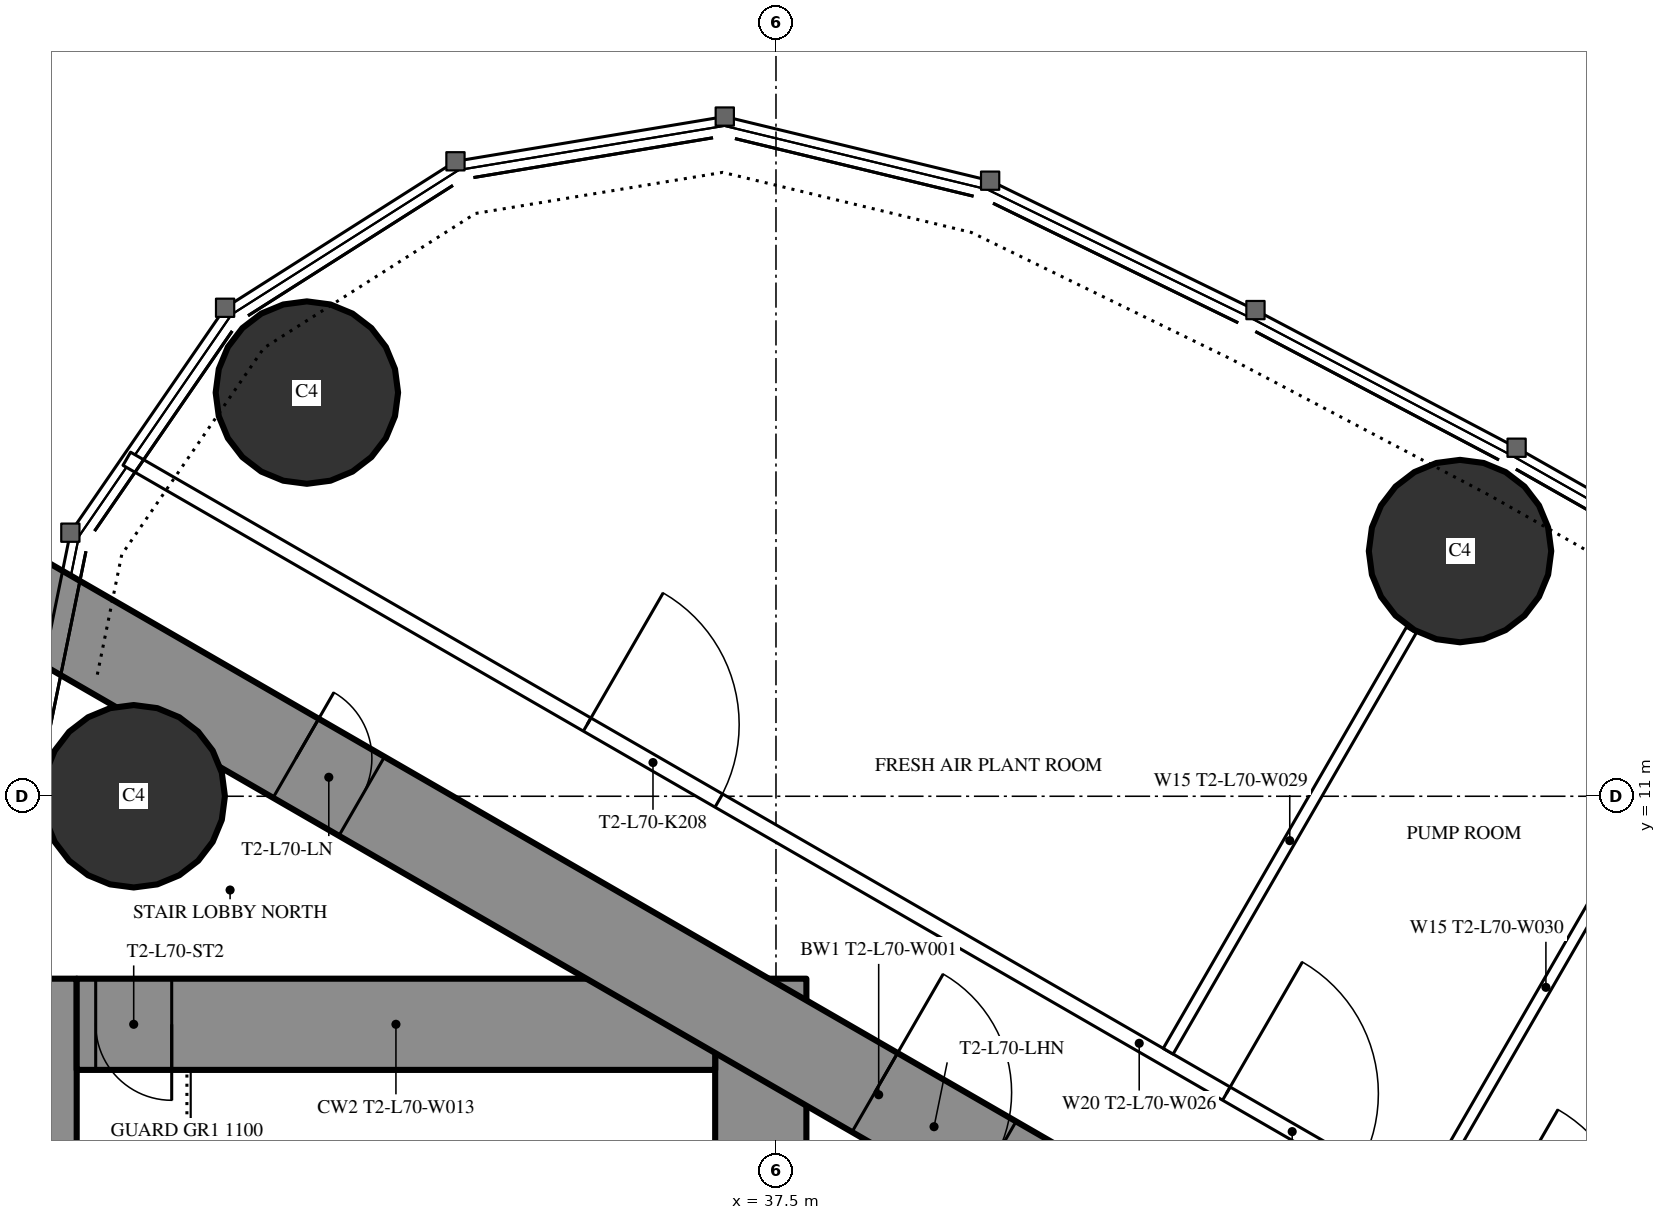
"""IFC4 building model, lengths in metres.
Left out: names, types, materials, properties, quantities, classifications, styles, units other than length and angle.
Written with IfcOpenShell. Run it as: python <this file> out.ifc"""

import sys

from ifc_helpers import new_model, si_unit, direction, frame, frame_2d, origin, origin_2d, place, context, subcontext, project, spatial, rectangle, circle, extrude, element, fill, save


model = new_model("IFC4")
c1 = context("Model", 3, precision=1e-05, world=origin(), true_north=direction((0.0, 1.0)))
c2 = subcontext(c1, "Body", "Model", "MODEL_VIEW")
j1 = project(units=[si_unit("LENGTHUNIT", "METRE"), si_unit("PLANEANGLEUNIT", "RADIAN")], contexts=[c1])
p1 = place(None, origin())
s1 = spatial("IfcSite", under=j1, at=p1, CompositionType="ELEMENT")
p2 = place(p1, origin())
s2 = spatial("IfcBuilding", under=s1, at=p2, CompositionType="ELEMENT")
p3 = place(p2, frame((0.0, 0.0, 268.3)))
s3 = spatial("IfcBuildingStorey", under=s2, at=p3, CompositionType="ELEMENT", Elevation=268.3)
for number, where, z_axis, x_axis in (
    (1, (31.328, 16.311, 0.0), (0.0, 0.0, 1.0), (1.0, 0.0, 0.0)),
    (2, (29.05, 11.0, 0.0), (0.0, 0.0, 1.0), (1.0, 0.0, 0.0)),
    (3, (46.499, 14.226, 0.0), (0.0, 0.0, 1.0), (1.0, 0.0, 0.0)),
):
    element("IfcColumn", number, at=place(p3, frame(where, z_axis=z_axis, x_axis=x_axis)), inside=s3, PredefinedType="COLUMN", context=c2, shape_type="SweptSolid", body=[
        extrude(circle(Radius=1.2, at=origin_2d()), origin(), (0.0, 0.0, 1.0), 5.0),
    ])
p4 = place(p3, frame((27.9, -8.6, 0.0), z_axis=(0.0, 0.0, 1.0), x_axis=(0.0, 1.0, 0.0)))
e4 = element("IfcWall", 4, at=p4, inside=s3, PredefinedType="SHEAR", context=c2, shape_type="SweptSolid", body=[
    extrude(rectangle(XDim=17.2, YDim=0.8, at=frame_2d((8.6, 0.0))), origin(), (0.0, 0.0, 1.0), 5.0),
])
p5 = place(p4, frame((9.35, 0.0, 0.0)))
e5 = element("IfcOpeningElement", 5, at=p5, cuts=e4, PredefinedType="OPENING", context=c2, shape_type="SweptSolid", body=[
    extrude(rectangle(XDim=0.9, YDim=2.2, at=frame_2d((0.45, 1.1))), frame((0.0, 0.41, 0.0), z_axis=(0.0, -1.0, 0.0), x_axis=(1.0, 0.0, 0.0)), (0.0, 0.0, 1.0), 0.82),
])
p6 = place(p3, frame((37.3, -8.6, 0.0), z_axis=(0.0, 0.0, 1.0), x_axis=(0.0, 1.0, 0.0)))
e6 = element("IfcWall", 6, at=p6, inside=s3, PredefinedType="SHEAR", context=c2, shape_type="SweptSolid", body=[
    extrude(rectangle(XDim=17.2, YDim=1.2, at=frame_2d((8.6, 0.0))), origin(), (0.0, 0.0, 1.0), 5.0),
])
p7 = place(p6, frame((7.7, 0.0, 0.0)))
e7 = element("IfcOpeningElement", 7, at=p7, cuts=e6, PredefinedType="OPENING", context=c2, shape_type="SweptSolid", body=[
    extrude(rectangle(XDim=1.8, YDim=2.2, at=frame_2d((0.9, 1.1))), frame((0.0, 0.61, 0.0), z_axis=(0.0, -1.0, 0.0), x_axis=(1.0, 0.0, 0.0)), (0.0, 0.0, 1.0), 1.22),
])
p8 = place(p3, frame((28.3, 8.0, 0.0), z_axis=(0.0, 0.0, 1.0), x_axis=(1.0, 0.0, 0.0)))
e8 = element("IfcWall", 8, at=p8, inside=s3, PredefinedType="SHEAR", context=c2, shape_type="SweptSolid", body=[
    extrude(rectangle(XDim=8.4, YDim=1.2, at=frame_2d((4.2, 0.0))), origin(), (0.0, 0.0, 1.0), 5.0),
])
p9 = place(p8, frame((0.25, 0.0, 0.0)))
e9 = element("IfcOpeningElement", 9, at=p9, cuts=e8, PredefinedType="OPENING", context=c2, shape_type="SweptSolid", body=[
    extrude(rectangle(XDim=1.0, YDim=2.2, at=frame_2d((0.5, 1.1))), frame((0.0, 0.61, 0.0), z_axis=(0.0, -1.0, 0.0), x_axis=(1.0, 0.0, 0.0)), (0.0, 0.0, 1.0), 1.22),
])
p10 = place(p3, frame((27.2, 13.8, 0.0), z_axis=(0.0, 0.0, 1.0), x_axis=(0.866024515034, -0.500001539357, 0.0)))
e10 = element("IfcWall", 10, at=p10, inside=s3, PredefinedType="SHEAR", context=c2, shape_type="SweptSolid", body=[
    extrude(rectangle(XDim=26.907, YDim=1.2, at=frame_2d((13.454, 0.0))), origin(), (0.0, 0.0, 1.0), 5.0),
])
p11 = place(p10, frame((4.6, 0.0, 0.0)))
e11 = element("IfcOpeningElement", 11, at=p11, cuts=e10, PredefinedType="OPENING", context=c2, shape_type="SweptSolid", body=[
    extrude(rectangle(XDim=1.0, YDim=2.2, at=frame_2d((0.5, 1.1))), frame((0.0, 0.61, 0.0), z_axis=(0.0, -1.0, 0.0), x_axis=(1.0, 0.0, 0.0)), (0.0, 0.0, 1.0), 1.22),
])
p12 = place(p10, frame((13.395, 0.0, 0.0)))
e12 = element("IfcOpeningElement", 12, at=p12, cuts=e10, PredefinedType="OPENING", context=c2, shape_type="SweptSolid", body=[
    extrude(rectangle(XDim=1.8, YDim=2.2, at=frame_2d((0.9, 1.1))), frame((0.0, 0.61, 0.0), z_axis=(0.0, -1.0, 0.0), x_axis=(1.0, 0.0, 0.0)), (0.0, 0.0, 1.0), 1.22),
])
p13 = place(p3, frame((28.959, 15.44, 0.0), z_axis=(0.0, 0.0, 1.0), x_axis=(0.866027378611, -0.499996579484, 0.0)))
e13 = element("IfcWall", 13, at=p13, inside=s3, PredefinedType="PARTITIONING", context=c2, shape_type="SweptSolid", body=[
    extrude(rectangle(XDim=30.76, YDim=0.2, at=frame_2d((15.38, 0.0))), origin(), (0.0, 0.0, 1.0), 4.7),
])
p14 = place(p13, frame((26.032, 0.0, 0.0)))
e14 = element("IfcOpeningElement", 14, at=p14, cuts=e13, PredefinedType="OPENING", context=c2, shape_type="SweptSolid", body=[
    extrude(rectangle(XDim=2.0, YDim=2.4, at=frame_2d((1.0, 1.2))), frame((0.0, 0.11, 0.0), z_axis=(0.0, -1.0, 0.0), x_axis=(1.0, 0.0, 0.0)), (0.0, 0.0, 1.0), 0.22),
])
p15 = place(p13, frame((20.587, 0.0, 0.0)))
e15 = element("IfcOpeningElement", 15, at=p15, cuts=e13, PredefinedType="OPENING", context=c2, shape_type="SweptSolid", body=[
    extrude(rectangle(XDim=2.0, YDim=2.4, at=frame_2d((1.0, 1.2))), frame((0.0, 0.11, 0.0), z_axis=(0.0, -1.0, 0.0), x_axis=(1.0, 0.0, 0.0)), (0.0, 0.0, 1.0), 0.22),
])
p16 = place(p13, frame((16.704, 0.0, 0.0)))
e16 = element("IfcOpeningElement", 16, at=p16, cuts=e13, PredefinedType="OPENING", context=c2, shape_type="SweptSolid", body=[
    extrude(rectangle(XDim=2.0, YDim=2.4, at=frame_2d((1.0, 1.2))), frame((0.0, 0.11, 0.0), z_axis=(0.0, -1.0, 0.0), x_axis=(1.0, 0.0, 0.0)), (0.0, 0.0, 1.0), 0.22),
])
p17 = place(p13, frame((6.994, 0.0, 0.0)))
e17 = element("IfcOpeningElement", 17, at=p17, cuts=e13, PredefinedType="OPENING", context=c2, shape_type="SweptSolid", body=[
    extrude(rectangle(XDim=2.0, YDim=2.4, at=frame_2d((1.0, 1.2))), frame((0.0, 0.11, 0.0), z_axis=(0.0, -1.0, 0.0), x_axis=(1.0, 0.0, 0.0)), (0.0, 0.0, 1.0), 0.22),
])
p18 = place(p3, frame((42.66, 7.646, 0.0), z_axis=(0.0, 0.0, 1.0), x_axis=(0.499996592859, 0.866027370889, 0.0)))
e18 = element("IfcWall", 18, at=p18, inside=s3, PredefinedType="PARTITIONING", context=c2, shape_type="SweptSolid", body=[
    extrude(rectangle(XDim=6.398, YDim=0.15, at=frame_2d((3.199, 0.0))), origin(), (0.0, 0.0, 1.0), 3.8),
])
p19 = place(p3, frame((46.023, 5.704, 0.0), z_axis=(0.0, 0.0, 1.0), x_axis=(0.499984478165, 0.866034365135, 0.0)))
e19 = element("IfcWall", 19, at=p19, inside=s3, PredefinedType="PARTITIONING", context=c2, shape_type="SweptSolid", body=[
    extrude(rectangle(XDim=6.426, YDim=0.15, at=frame_2d((3.213, 0.0))), origin(), (0.0, 0.0, 1.0), 3.8),
])
p20 = place(p16, origin())
e20 = element("IfcDoor", 20, at=p20, inside=s3, OperationType="DOUBLE_DOOR_SINGLE_SWING", PredefinedType="DOOR", context=c2, shape_type="SweptSolid", body=[
    extrude(rectangle(XDim=2.0, YDim=2.4, at=frame_2d((1.0, 1.2))), frame((0.0, 0.025, 0.0), z_axis=(0.0, -1.0, 0.0), x_axis=(1.0, 0.0, 0.0)), (0.0, 0.0, 1.0), 0.05),
])
fill(e16, e20)
p21 = place(p17, origin())
e21 = element("IfcDoor", 21, at=p21, inside=s3, OperationType="DOUBLE_DOOR_SINGLE_SWING", PredefinedType="DOOR", context=c2, shape_type="SweptSolid", body=[
    extrude(rectangle(XDim=2.0, YDim=2.4, at=frame_2d((1.0, 1.2))), frame((0.0, 0.025, 0.0), z_axis=(0.0, -1.0, 0.0), x_axis=(1.0, 0.0, 0.0)), (0.0, 0.0, 1.0), 0.05),
])
fill(e17, e21)
p22 = place(p11, origin())
e22 = element("IfcDoor", 22, at=p22, inside=s3, OperationType="SINGLE_SWING_LEFT", PredefinedType="DOOR", context=c2, shape_type="SweptSolid", body=[
    extrude(rectangle(XDim=1.0, YDim=2.2, at=frame_2d((0.5, 1.1))), frame((0.0, 0.025, 0.0), z_axis=(0.0, -1.0, 0.0), x_axis=(1.0, 0.0, 0.0)), (0.0, 0.0, 1.0), 0.05),
])
fill(e11, e22)
p23 = place(p12, origin())
e23 = element("IfcDoor", 23, at=p23, inside=s3, OperationType="DOUBLE_DOOR_SINGLE_SWING", PredefinedType="DOOR", context=c2, shape_type="SweptSolid", body=[
    extrude(rectangle(XDim=1.8, YDim=2.2, at=frame_2d((0.9, 1.1))), frame((0.0, 0.025, 0.0), z_axis=(0.0, -1.0, 0.0), x_axis=(1.0, 0.0, 0.0)), (0.0, 0.0, 1.0), 0.05),
])
fill(e12, e23)
p24 = place(p9, origin())
e24 = element("IfcDoor", 24, at=p24, inside=s3, OperationType="SINGLE_SWING_RIGHT", PredefinedType="DOOR", context=c2, shape_type="SweptSolid", body=[
    extrude(rectangle(XDim=1.0, YDim=2.2, at=frame_2d((0.5, 1.1))), frame((0.0, 0.025, 0.0), z_axis=(0.0, -1.0, 0.0), x_axis=(1.0, 0.0, 0.0)), (0.0, 0.0, 1.0), 0.05),
])
fill(e9, e24)
save(model, sys.argv[1])
